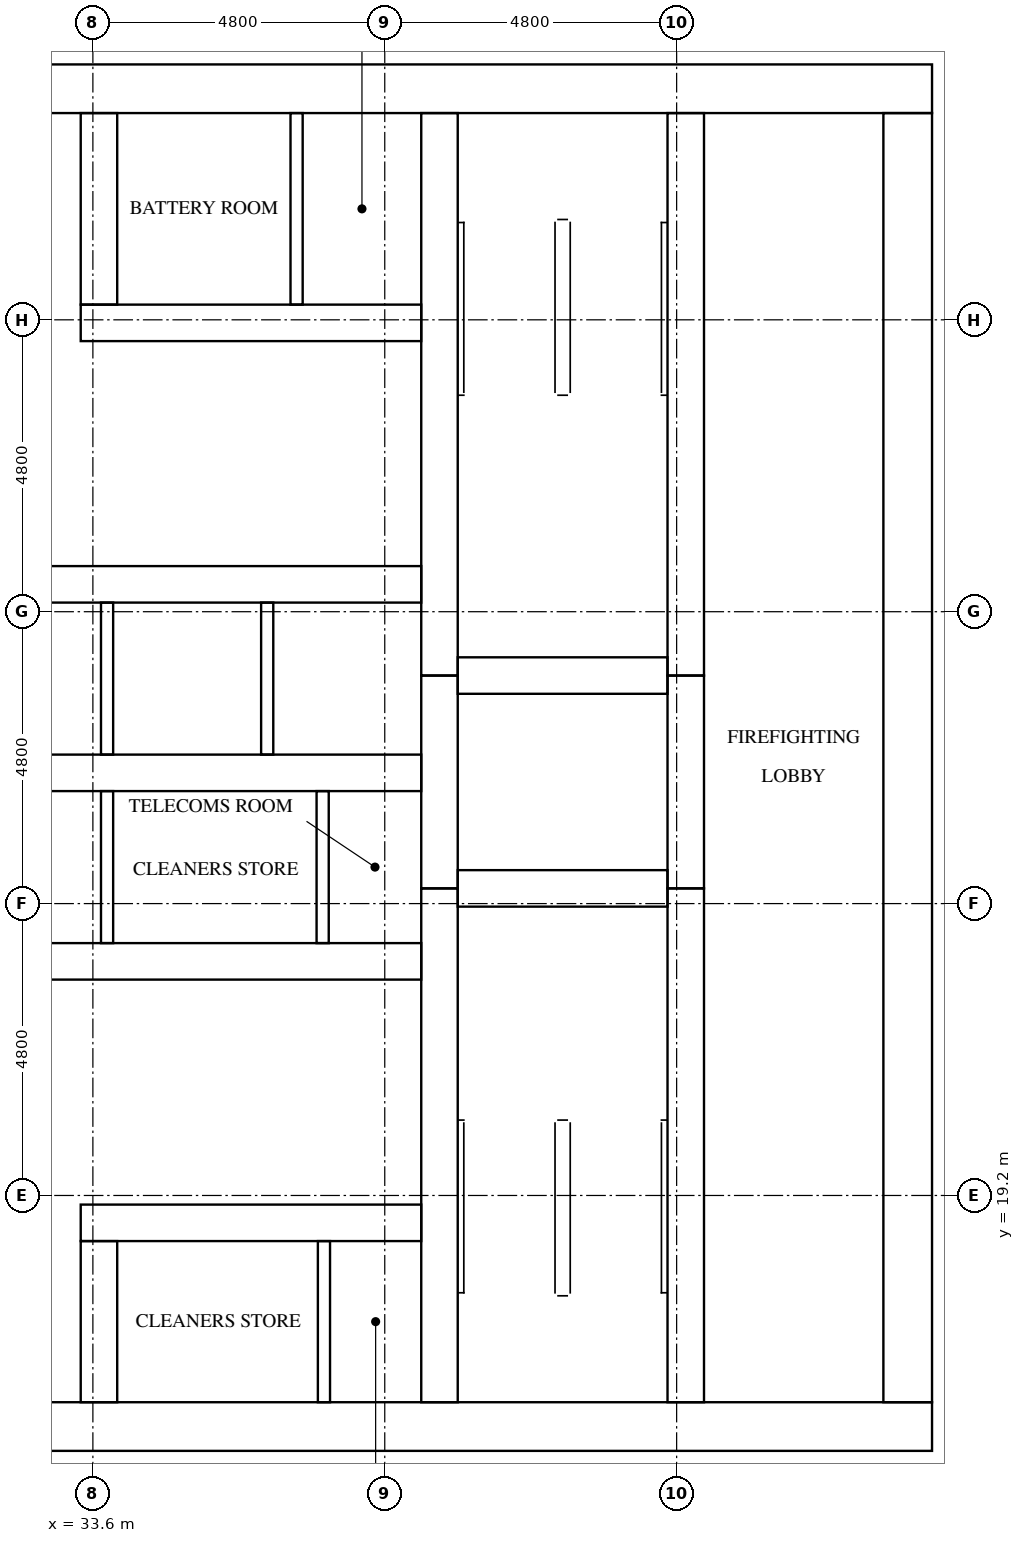
"""IFC4 building model, lengths in metres.
Left out: names, types, materials, properties, quantities, classifications, styles, units other than length and angle.
Written with IfcOpenShell. Run it as: python <this file> out.ifc"""

import sys

from ifc_helpers import new_model, si_unit, direction, frame, frame_2d, origin, place, context, subcontext, project, spatial, rectangle, extrude, element, fill, save


model = new_model("IFC4")
c1 = context("Model", 3, precision=1e-05, world=origin(), true_north=direction((0.0, 1.0)))
c2 = subcontext(c1, "Body", "Model", "MODEL_VIEW")
j1 = project(units=[si_unit("LENGTHUNIT", "METRE"), si_unit("PLANEANGLEUNIT", "RADIAN")], contexts=[c1])
p1 = place(None, origin())
s1 = spatial("IfcSite", under=j1, at=p1, CompositionType="ELEMENT")
p2 = place(p1, origin())
s2 = spatial("IfcBuilding", under=s1, at=p2, CompositionType="ELEMENT")
p3 = place(p2, frame((0.0, 0.0, 170.0)))
s3 = spatial("IfcBuildingStorey", under=s2, at=p3, CompositionType="ELEMENT", Elevation=170.0)
p4 = place(p3, frame((15.0, 15.4, 0.0), z_axis=(0.0, 0.0, 1.0), x_axis=(1.0, 0.0, 0.0)))
e1 = element("IfcWall", 1, at=p4, inside=s3, PredefinedType="SHEAR", context=c2, shape_type="SweptSolid", body=[
    extrude(rectangle(XDim=32.4, YDim=0.8, at=frame_2d((16.2, 0.0))), origin(), (0.0, 0.0, 1.0), 3.1),
])
p5 = place(p4, frame((15.3, 0.0, 0.0)))
e2 = element("IfcOpeningElement", 2, at=p5, cuts=e1, PredefinedType="OPENING", context=c2, shape_type="SweptSolid", body=[
    extrude(rectangle(XDim=1.8, YDim=2.1, at=frame_2d((0.9, 1.05))), frame((0.0, 0.41, 0.0), z_axis=(0.0, -1.0, 0.0), x_axis=(1.0, 0.0, 0.0)), (0.0, 0.0, 1.0), 0.82),
])
p6 = place(p3, frame((15.0, 37.4, 0.0), z_axis=(0.0, 0.0, 1.0), x_axis=(1.0, 0.0, 0.0)))
e3 = element("IfcWall", 3, at=p6, inside=s3, PredefinedType="SHEAR", context=c2, shape_type="SweptSolid", body=[
    extrude(rectangle(XDim=32.4, YDim=0.8, at=frame_2d((16.2, 0.0))), origin(), (0.0, 0.0, 1.0), 3.1),
])
p7 = place(p6, frame((15.3, 0.0, 0.0)))
e4 = element("IfcOpeningElement", 4, at=p7, cuts=e3, PredefinedType="OPENING", context=c2, shape_type="SweptSolid", body=[
    extrude(rectangle(XDim=1.8, YDim=2.1, at=frame_2d((0.9, 1.05))), frame((0.0, 0.41, 0.0), z_axis=(0.0, -1.0, 0.0), x_axis=(1.0, 0.0, 0.0)), (0.0, 0.0, 1.0), 0.82),
])
p8 = place(p6, frame((1.51, 0.0, 0.0)))
e5 = element("IfcOpeningElement", 5, at=p8, cuts=e3, PredefinedType="OPENING", context=c2, shape_type="SweptSolid", body=[
    extrude(rectangle(XDim=1.0, YDim=2.1, at=frame_2d((0.5, 1.05))), frame((0.0, 0.41, 0.0), z_axis=(0.0, -1.0, 0.0), x_axis=(1.0, 0.0, 0.0)), (0.0, 0.0, 1.0), 0.82),
])
p9 = place(p6, frame((5.11, 0.0, 0.0)))
e6 = element("IfcOpeningElement", 6, at=p9, cuts=e3, PredefinedType="OPENING", context=c2, shape_type="SweptSolid", body=[
    extrude(rectangle(XDim=1.0, YDim=2.1, at=frame_2d((0.5, 1.05))), frame((0.0, 0.41, 0.0), z_axis=(0.0, -1.0, 0.0), x_axis=(1.0, 0.0, 0.0)), (0.0, 0.0, 1.0), 0.82),
])
p10 = place(p3, frame((47.0, 15.8, 0.0), z_axis=(0.0, 0.0, 1.0), x_axis=(0.0, 1.0, 0.0)))
e7 = element("IfcWall", 7, at=p10, inside=s3, PredefinedType="SHEAR", context=c2, shape_type="SweptSolid", body=[
    extrude(rectangle(XDim=21.2, YDim=0.8, at=frame_2d((10.6, 0.0))), origin(), (0.0, 0.0, 1.0), 3.1),
])
p11 = place(p10, frame((10.3, 0.0, 0.0)))
e8 = element("IfcOpeningElement", 8, at=p11, cuts=e7, PredefinedType="OPENING", context=c2, shape_type="SweptSolid", body=[
    extrude(rectangle(XDim=1.2, YDim=2.1, at=frame_2d((0.6, 1.05))), frame((0.0, 0.41, 0.0), z_axis=(0.0, -1.0, 0.0), x_axis=(1.0, 0.0, 0.0)), (0.0, 0.0, 1.0), 0.82),
])
p12 = place(p3, frame((39.3, 15.8, 0.0), z_axis=(0.0, 0.0, 1.0), x_axis=(0.0, 1.0, 0.0)))
e9 = element("IfcWall", 9, at=p12, inside=s3, PredefinedType="SHEAR", context=c2, shape_type="SweptSolid", body=[
    extrude(rectangle(XDim=8.45, YDim=0.6, at=frame_2d((4.225, 0.0))), origin(), (0.0, 0.0, 1.0), 3.1),
])
p13 = place(p3, frame((39.3, 24.25, 0.0), z_axis=(0.0, 0.0, 1.0), x_axis=(0.0, 1.0, 0.0)))
e10 = element("IfcWall", 10, at=p13, inside=s3, PredefinedType="SHEAR", context=c2, shape_type="SweptSolid", body=[
    extrude(rectangle(XDim=3.5, YDim=0.6, at=frame_2d((1.75, 0.0))), origin(), (0.0, 0.0, 1.0), 3.1),
])
p14 = place(p3, frame((39.3, 27.75, 0.0), z_axis=(0.0, 0.0, 1.0), x_axis=(0.0, 1.0, 0.0)))
e11 = element("IfcWall", 11, at=p14, inside=s3, PredefinedType="SHEAR", context=c2, shape_type="SweptSolid", body=[
    extrude(rectangle(XDim=9.25, YDim=0.6, at=frame_2d((4.625, 0.0))), origin(), (0.0, 0.0, 1.0), 3.1),
])
p15 = place(p3, frame((43.35, 15.8, 0.0), z_axis=(0.0, 0.0, 1.0), x_axis=(0.0, 1.0, 0.0)))
e12 = element("IfcWall", 12, at=p15, inside=s3, PredefinedType="SHEAR", context=c2, shape_type="SweptSolid", body=[
    extrude(rectangle(XDim=8.45, YDim=0.6, at=frame_2d((4.225, 0.0))), origin(), (0.0, 0.0, 1.0), 3.1),
])
p16 = place(p15, frame((0.4, 0.0, 0.0)))
e13 = element("IfcOpeningElement", 13, at=p16, cuts=e12, PredefinedType="OPENING", context=c2, shape_type="SweptSolid", body=[
    extrude(rectangle(XDim=1.2, YDim=2.1, at=frame_2d((0.6, 1.05))), frame((0.0, 0.31, 0.0), z_axis=(0.0, -1.0, 0.0), x_axis=(1.0, 0.0, 0.0)), (0.0, 0.0, 1.0), 0.62),
])
p17 = place(p3, frame((43.35, 24.25, 0.0), z_axis=(0.0, 0.0, 1.0), x_axis=(0.0, 1.0, 0.0)))
e14 = element("IfcWall", 14, at=p17, inside=s3, PredefinedType="SHEAR", context=c2, shape_type="SweptSolid", body=[
    extrude(rectangle(XDim=3.5, YDim=0.6, at=frame_2d((1.75, 0.0))), origin(), (0.0, 0.0, 1.0), 3.1),
])
p18 = place(p17, frame((1.2, 0.0, 0.0)))
e15 = element("IfcOpeningElement", 15, at=p18, cuts=e14, PredefinedType="OPENING", context=c2, shape_type="SweptSolid", body=[
    extrude(rectangle(XDim=1.1, YDim=2.1, at=frame_2d((0.55, 1.05))), frame((0.0, 0.31, 0.0), z_axis=(0.0, -1.0, 0.0), x_axis=(1.0, 0.0, 0.0)), (0.0, 0.0, 1.0), 0.62),
])
p19 = place(p3, frame((43.35, 27.75, 0.0), z_axis=(0.0, 0.0, 1.0), x_axis=(0.0, 1.0, 0.0)))
e16 = element("IfcWall", 16, at=p19, inside=s3, PredefinedType="SHEAR", context=c2, shape_type="SweptSolid", body=[
    extrude(rectangle(XDim=9.25, YDim=0.6, at=frame_2d((4.625, 0.0))), origin(), (0.0, 0.0, 1.0), 3.1),
])
p20 = place(p19, frame((7.65, 0.0, 0.0)))
e17 = element("IfcOpeningElement", 17, at=p20, cuts=e16, PredefinedType="OPENING", context=c2, shape_type="SweptSolid", body=[
    extrude(rectangle(XDim=1.2, YDim=2.1, at=frame_2d((0.6, 1.05))), frame((0.0, 0.31, 0.0), z_axis=(0.0, -1.0, 0.0), x_axis=(1.0, 0.0, 0.0)), (0.0, 0.0, 1.0), 0.62),
])
for number, where, z_axis, x_axis in (
    (18, (39.6, 24.25, 0.0), (0.0, 0.0, 1.0), (1.0, 0.0, 0.0)),
    (19, (39.6, 27.75, 0.0), (0.0, 0.0, 1.0), (1.0, 0.0, 0.0)),
):
    element("IfcWall", number, at=place(p3, frame(where, z_axis=z_axis, x_axis=x_axis)), inside=s3, PredefinedType="SHEAR", context=c2, shape_type="SweptSolid", body=[
        extrude(rectangle(XDim=3.45, YDim=0.6, at=frame_2d((1.725, 0.0))), origin(), (0.0, 0.0, 1.0), 3.1),
    ])
p21 = place(p3, frame((33.4, 18.75, 0.0), z_axis=(0.0, 0.0, 1.0), x_axis=(1.0, 0.0, 0.0)))
e20 = element("IfcWall", 20, at=p21, inside=s3, PredefinedType="SHEAR", context=c2, shape_type="SweptSolid", body=[
    extrude(rectangle(XDim=5.6, YDim=0.6, at=frame_2d((2.8, 0.0))), origin(), (0.0, 0.0, 1.0), 3.1),
])
p22 = place(p21, frame((1.75, 0.0, 0.0)))
e21 = element("IfcOpeningElement", 21, at=p22, cuts=e20, PredefinedType="OPENING", context=c2, shape_type="SweptSolid", body=[
    extrude(rectangle(XDim=1.0, YDim=2.1, at=frame_2d((0.5, 1.05))), frame((0.0, 0.31, 0.0), z_axis=(0.0, -1.0, 0.0), x_axis=(1.0, 0.0, 0.0)), (0.0, 0.0, 1.0), 0.62),
])
p23 = place(p21, frame((4.35, 0.0, 0.0)))
e22 = element("IfcOpeningElement", 22, at=p23, cuts=e20, PredefinedType="OPENING", context=c2, shape_type="SweptSolid", body=[
    extrude(rectangle(XDim=1.0, YDim=2.1, at=frame_2d((0.5, 1.05))), frame((0.0, 0.31, 0.0), z_axis=(0.0, -1.0, 0.0), x_axis=(1.0, 0.0, 0.0)), (0.0, 0.0, 1.0), 0.62),
])
p24 = place(p3, frame((23.4, 23.05, 0.0), z_axis=(0.0, 0.0, 1.0), x_axis=(1.0, 0.0, 0.0)))
e23 = element("IfcWall", 23, at=p24, inside=s3, PredefinedType="SHEAR", context=c2, shape_type="SweptSolid", body=[
    extrude(rectangle(XDim=15.6, YDim=0.6, at=frame_2d((7.8, 0.0))), origin(), (0.0, 0.0, 1.0), 3.1),
])
p25 = place(p24, frame((2.033, 0.0, 0.0)))
e24 = element("IfcOpeningElement", 24, at=p25, cuts=e23, PredefinedType="OPENING", context=c2, shape_type="SweptSolid", body=[
    extrude(rectangle(XDim=1.0, YDim=2.1, at=frame_2d((0.5, 1.05))), frame((0.0, 0.31, 0.0), z_axis=(0.0, -1.0, 0.0), x_axis=(1.0, 0.0, 0.0)), (0.0, 0.0, 1.0), 0.62),
])
p26 = place(p24, frame((11.706, 0.0, 0.0)))
e25 = element("IfcOpeningElement", 25, at=p26, cuts=e23, PredefinedType="OPENING", context=c2, shape_type="SweptSolid", body=[
    extrude(rectangle(XDim=1.0, YDim=2.1, at=frame_2d((0.5, 1.05))), frame((0.0, 0.31, 0.0), z_axis=(0.0, -1.0, 0.0), x_axis=(1.0, 0.0, 0.0)), (0.0, 0.0, 1.0), 0.62),
])
p27 = place(p24, frame((14.339, 0.0, 0.0)))
e26 = element("IfcOpeningElement", 26, at=p27, cuts=e23, PredefinedType="OPENING", context=c2, shape_type="SweptSolid", body=[
    extrude(rectangle(XDim=1.0, YDim=2.1, at=frame_2d((0.5, 1.05))), frame((0.0, 0.31, 0.0), z_axis=(0.0, -1.0, 0.0), x_axis=(1.0, 0.0, 0.0)), (0.0, 0.0, 1.0), 0.62),
])
p28 = place(p3, frame((23.4, 26.15, 0.0), z_axis=(0.0, 0.0, 1.0), x_axis=(1.0, 0.0, 0.0)))
e27 = element("IfcWall", 27, at=p28, inside=s3, PredefinedType="SHEAR", context=c2, shape_type="SweptSolid", body=[
    extrude(rectangle(XDim=15.6, YDim=0.6, at=frame_2d((7.8, 0.0))), origin(), (0.0, 0.0, 1.0), 3.1),
])
p29 = place(p3, frame((23.4, 29.25, 0.0), z_axis=(0.0, 0.0, 1.0), x_axis=(1.0, 0.0, 0.0)))
e28 = element("IfcWall", 28, at=p29, inside=s3, PredefinedType="SHEAR", context=c2, shape_type="SweptSolid", body=[
    extrude(rectangle(XDim=15.6, YDim=0.6, at=frame_2d((7.8, 0.0))), origin(), (0.0, 0.0, 1.0), 3.1),
])
p30 = place(p29, frame((0.667, 0.0, 0.0)))
e29 = element("IfcOpeningElement", 29, at=p30, cuts=e28, PredefinedType="OPENING", context=c2, shape_type="SweptSolid", body=[
    extrude(rectangle(XDim=1.1, YDim=2.1, at=frame_2d((0.55, 1.05))), frame((0.0, 0.31, 0.0), z_axis=(0.0, -1.0, 0.0), x_axis=(1.0, 0.0, 0.0)), (0.0, 0.0, 1.0), 0.62),
])
p31 = place(p29, frame((3.3, 0.0, 0.0)))
e30 = element("IfcOpeningElement", 30, at=p31, cuts=e28, PredefinedType="OPENING", context=c2, shape_type="SweptSolid", body=[
    extrude(rectangle(XDim=1.1, YDim=2.1, at=frame_2d((0.55, 1.05))), frame((0.0, 0.31, 0.0), z_axis=(0.0, -1.0, 0.0), x_axis=(1.0, 0.0, 0.0)), (0.0, 0.0, 1.0), 0.62),
])
p32 = place(p29, frame((5.933, 0.0, 0.0)))
e31 = element("IfcOpeningElement", 31, at=p32, cuts=e28, PredefinedType="OPENING", context=c2, shape_type="SweptSolid", body=[
    extrude(rectangle(XDim=1.1, YDim=2.1, at=frame_2d((0.55, 1.05))), frame((0.0, 0.31, 0.0), z_axis=(0.0, -1.0, 0.0), x_axis=(1.0, 0.0, 0.0)), (0.0, 0.0, 1.0), 0.62),
])
p33 = place(p29, frame((8.567, 0.0, 0.0)))
e32 = element("IfcOpeningElement", 32, at=p33, cuts=e28, PredefinedType="OPENING", context=c2, shape_type="SweptSolid", body=[
    extrude(rectangle(XDim=1.1, YDim=2.1, at=frame_2d((0.55, 1.05))), frame((0.0, 0.31, 0.0), z_axis=(0.0, -1.0, 0.0), x_axis=(1.0, 0.0, 0.0)), (0.0, 0.0, 1.0), 0.62),
])
p34 = place(p29, frame((11.2, 0.0, 0.0)))
e33 = element("IfcOpeningElement", 33, at=p34, cuts=e28, PredefinedType="OPENING", context=c2, shape_type="SweptSolid", body=[
    extrude(rectangle(XDim=1.1, YDim=2.1, at=frame_2d((0.55, 1.05))), frame((0.0, 0.31, 0.0), z_axis=(0.0, -1.0, 0.0), x_axis=(1.0, 0.0, 0.0)), (0.0, 0.0, 1.0), 0.62),
])
p35 = place(p29, frame((13.833, 0.0, 0.0)))
e34 = element("IfcOpeningElement", 34, at=p35, cuts=e28, PredefinedType="OPENING", context=c2, shape_type="SweptSolid", body=[
    extrude(rectangle(XDim=1.1, YDim=2.1, at=frame_2d((0.55, 1.05))), frame((0.0, 0.31, 0.0), z_axis=(0.0, -1.0, 0.0), x_axis=(1.0, 0.0, 0.0)), (0.0, 0.0, 1.0), 0.62),
])
p36 = place(p3, frame((33.4, 33.55, 0.0), z_axis=(0.0, 0.0, 1.0), x_axis=(1.0, 0.0, 0.0)))
e35 = element("IfcWall", 35, at=p36, inside=s3, PredefinedType="SHEAR", context=c2, shape_type="SweptSolid", body=[
    extrude(rectangle(XDim=5.6, YDim=0.6, at=frame_2d((2.8, 0.0))), origin(), (0.0, 0.0, 1.0), 3.1),
])
p37 = place(p36, frame((1.525, 0.0, 0.0)))
e36 = element("IfcOpeningElement", 36, at=p37, cuts=e35, PredefinedType="OPENING", context=c2, shape_type="SweptSolid", body=[
    extrude(rectangle(XDim=1.0, YDim=2.1, at=frame_2d((0.5, 1.05))), frame((0.0, 0.31, 0.0), z_axis=(0.0, -1.0, 0.0), x_axis=(1.0, 0.0, 0.0)), (0.0, 0.0, 1.0), 0.62),
])
p38 = place(p36, frame((4.125, 0.0, 0.0)))
e37 = element("IfcOpeningElement", 37, at=p38, cuts=e35, PredefinedType="OPENING", context=c2, shape_type="SweptSolid", body=[
    extrude(rectangle(XDim=1.0, YDim=2.1, at=frame_2d((0.5, 1.05))), frame((0.0, 0.31, 0.0), z_axis=(0.0, -1.0, 0.0), x_axis=(1.0, 0.0, 0.0)), (0.0, 0.0, 1.0), 0.62),
])
p39 = place(p3, frame((33.7, 15.8, 0.0), z_axis=(0.0, 0.0, 1.0), x_axis=(0.0, 1.0, 0.0)))
e38 = element("IfcWall", 38, at=p39, inside=s3, PredefinedType="SHEAR", context=c2, shape_type="SweptSolid", body=[
    extrude(rectangle(XDim=2.65, YDim=0.6, at=frame_2d((1.325, 0.0))), origin(), (0.0, 0.0, 1.0), 3.1),
])
p40 = place(p3, frame((33.7, 33.85, 0.0), z_axis=(0.0, 0.0, 1.0), x_axis=(0.0, 1.0, 0.0)))
e39 = element("IfcWall", 39, at=p40, inside=s3, PredefinedType="SHEAR", context=c2, shape_type="SweptSolid", body=[
    extrude(rectangle(XDim=3.15, YDim=0.6, at=frame_2d((1.575, 0.0))), origin(), (0.0, 0.0, 1.0), 3.1),
])
for number, where, z_axis, x_axis in (
    (40, (33.833, 23.35, 0.0), (0.0, 0.0, 1.0), (0.0, 1.0, 0.0)),
    (41, (33.833, 26.45, 0.0), (0.0, 0.0, 1.0), (0.0, 1.0, 0.0)),
    (42, (36.467, 26.45, 0.0), (0.0, 0.0, 1.0), (0.0, 1.0, 0.0)),
):
    element("IfcWall", number, at=place(p3, frame(where, z_axis=z_axis, x_axis=x_axis)), inside=s3, PredefinedType="SOLIDWALL", context=c2, shape_type="SweptSolid", body=[
        extrude(rectangle(XDim=2.5, YDim=0.2, at=frame_2d((1.25, 0.0))), origin(), (0.0, 0.0, 1.0), 3.1),
    ])
p41 = place(p3, frame((37.379, 23.35, 0.0), z_axis=(0.0, 0.0, 1.0), x_axis=(0.0, 1.0, 0.0)))
e43 = element("IfcWall", 43, at=p41, inside=s3, PredefinedType="PARTITIONING", context=c2, shape_type="SweptSolid", body=[
    extrude(rectangle(XDim=2.5, YDim=0.2, at=frame_2d((1.25, 0.0))), origin(), (0.0, 0.0, 1.0), 3.1),
])
p42 = place(p3, frame((37.4, 15.8, 0.0), z_axis=(0.0, 0.0, 1.0), x_axis=(0.0, 1.0, 0.0)))
e44 = element("IfcWall", 44, at=p42, inside=s3, PredefinedType="PARTITIONING", context=c2, shape_type="SweptSolid", body=[
    extrude(rectangle(XDim=2.65, YDim=0.2, at=frame_2d((1.325, 0.0))), origin(), (0.0, 0.0, 1.0), 3.1),
])
p43 = place(p3, frame((36.95, 33.85, 0.0), z_axis=(0.0, 0.0, 1.0), x_axis=(0.0, 1.0, 0.0)))
e45 = element("IfcWall", 45, at=p43, inside=s3, PredefinedType="PARTITIONING", context=c2, shape_type="SweptSolid", body=[
    extrude(rectangle(XDim=3.15, YDim=0.2, at=frame_2d((1.575, 0.0))), origin(), (0.0, 0.0, 1.0), 3.1),
])
p44 = place(p33, origin())
e46 = element("IfcDoor", 46, at=p44, inside=s3, OperationType="DOUBLE_DOOR_SLIDING", PredefinedType="DOOR", context=c2, shape_type="SweptSolid", body=[
    extrude(rectangle(XDim=1.1, YDim=2.1, at=frame_2d((0.55, 1.05))), frame((0.0, 0.025, 0.0), z_axis=(0.0, -1.0, 0.0), x_axis=(1.0, 0.0, 0.0)), (0.0, 0.0, 1.0), 0.05),
])
fill(e32, e46)
p45 = place(p34, origin())
e47 = element("IfcDoor", 47, at=p45, inside=s3, OperationType="DOUBLE_DOOR_SLIDING", PredefinedType="DOOR", context=c2, shape_type="SweptSolid", body=[
    extrude(rectangle(XDim=1.1, YDim=2.1, at=frame_2d((0.55, 1.05))), frame((0.0, 0.025, 0.0), z_axis=(0.0, -1.0, 0.0), x_axis=(1.0, 0.0, 0.0)), (0.0, 0.0, 1.0), 0.05),
])
fill(e33, e47)
p46 = place(p35, origin())
e48 = element("IfcDoor", 48, at=p46, inside=s3, OperationType="DOUBLE_DOOR_SLIDING", PredefinedType="DOOR", context=c2, shape_type="SweptSolid", body=[
    extrude(rectangle(XDim=1.1, YDim=2.1, at=frame_2d((0.55, 1.05))), frame((0.0, 0.025, 0.0), z_axis=(0.0, -1.0, 0.0), x_axis=(1.0, 0.0, 0.0)), (0.0, 0.0, 1.0), 0.05),
])
fill(e34, e48)
p47 = place(p18, origin())
e49 = element("IfcDoor", 49, at=p47, inside=s3, OperationType="DOUBLE_DOOR_SLIDING", PredefinedType="DOOR", context=c2, shape_type="SweptSolid", body=[
    extrude(rectangle(XDim=1.1, YDim=2.1, at=frame_2d((0.55, 1.05))), frame((0.0, 0.025, 0.0), z_axis=(0.0, -1.0, 0.0), x_axis=(1.0, 0.0, 0.0)), (0.0, 0.0, 1.0), 0.05),
])
fill(e15, e49)
p48 = place(p16, origin())
e50 = element("IfcDoor", 50, at=p48, inside=s3, OperationType="SINGLE_SWING_LEFT", PredefinedType="DOOR", context=c2, shape_type="SweptSolid", body=[
    extrude(rectangle(XDim=1.2, YDim=2.1, at=frame_2d((0.6, 1.05))), frame((0.0, 0.025, 0.0), z_axis=(0.0, -1.0, 0.0), x_axis=(1.0, 0.0, 0.0)), (0.0, 0.0, 1.0), 0.05),
])
fill(e13, e50)
p49 = place(p20, origin())
e51 = element("IfcDoor", 51, at=p49, inside=s3, OperationType="SINGLE_SWING_RIGHT", PredefinedType="DOOR", context=c2, shape_type="SweptSolid", body=[
    extrude(rectangle(XDim=1.2, YDim=2.1, at=frame_2d((0.6, 1.05))), frame((0.0, 0.025, 0.0), z_axis=(0.0, -1.0, 0.0), x_axis=(1.0, 0.0, 0.0)), (0.0, 0.0, 1.0), 0.05),
])
fill(e17, e51)
p50 = place(p11, origin())
e52 = element("IfcDoor", 52, at=p50, inside=s3, OperationType="SINGLE_SWING_RIGHT", PredefinedType="DOOR", context=c2, shape_type="SweptSolid", body=[
    extrude(rectangle(XDim=1.2, YDim=2.1, at=frame_2d((0.6, 1.05))), frame((0.0, 0.025, 0.0), z_axis=(0.0, -1.0, 0.0), x_axis=(1.0, 0.0, 0.0)), (0.0, 0.0, 1.0), 0.05),
])
fill(e8, e52)
p51 = place(p26, frame((1.0, 0.0, 0.0), z_axis=(0.0, 0.0, 1.0), x_axis=(-1.0, 0.0, 0.0)))
e53 = element("IfcDoor", 53, at=p51, inside=s3, OperationType="SINGLE_SWING_RIGHT", PredefinedType="DOOR", context=c2, shape_type="SweptSolid", body=[
    extrude(rectangle(XDim=1.0, YDim=2.1, at=frame_2d((0.5, 1.05))), frame((0.0, 0.025, 0.0), z_axis=(0.0, -1.0, 0.0), x_axis=(1.0, 0.0, 0.0)), (0.0, 0.0, 1.0), 0.05),
])
fill(e25, e53)
p52 = place(p27, frame((1.0, 0.0, 0.0), z_axis=(0.0, 0.0, 1.0), x_axis=(-1.0, 0.0, 0.0)))
e54 = element("IfcDoor", 54, at=p52, inside=s3, OperationType="SINGLE_SWING_LEFT", PredefinedType="DOOR", context=c2, shape_type="SweptSolid", body=[
    extrude(rectangle(XDim=1.0, YDim=2.1, at=frame_2d((0.5, 1.05))), frame((0.0, 0.025, 0.0), z_axis=(0.0, -1.0, 0.0), x_axis=(1.0, 0.0, 0.0)), (0.0, 0.0, 1.0), 0.05),
])
fill(e26, e54)
p53 = place(p22, origin())
e55 = element("IfcDoor", 55, at=p53, inside=s3, OperationType="SINGLE_SWING_RIGHT", PredefinedType="DOOR", context=c2, shape_type="SweptSolid", body=[
    extrude(rectangle(XDim=1.0, YDim=2.1, at=frame_2d((0.5, 1.05))), frame((0.0, 0.025, 0.0), z_axis=(0.0, -1.0, 0.0), x_axis=(1.0, 0.0, 0.0)), (0.0, 0.0, 1.0), 0.05),
])
fill(e21, e55)
p54 = place(p23, origin())
e56 = element("IfcDoor", 56, at=p54, inside=s3, OperationType="SINGLE_SWING_LEFT", PredefinedType="DOOR", context=c2, shape_type="SweptSolid", body=[
    extrude(rectangle(XDim=1.0, YDim=2.1, at=frame_2d((0.5, 1.05))), frame((0.0, 0.025, 0.0), z_axis=(0.0, -1.0, 0.0), x_axis=(1.0, 0.0, 0.0)), (0.0, 0.0, 1.0), 0.05),
])
fill(e22, e56)
p55 = place(p37, frame((1.0, 0.0, 0.0), z_axis=(0.0, 0.0, 1.0), x_axis=(-1.0, 0.0, 0.0)))
e57 = element("IfcDoor", 57, at=p55, inside=s3, OperationType="SINGLE_SWING_RIGHT", PredefinedType="DOOR", context=c2, shape_type="SweptSolid", body=[
    extrude(rectangle(XDim=1.0, YDim=2.1, at=frame_2d((0.5, 1.05))), frame((0.0, 0.025, 0.0), z_axis=(0.0, -1.0, 0.0), x_axis=(1.0, 0.0, 0.0)), (0.0, 0.0, 1.0), 0.05),
])
fill(e36, e57)
p56 = place(p38, frame((1.0, 0.0, 0.0), z_axis=(0.0, 0.0, 1.0), x_axis=(-1.0, 0.0, 0.0)))
e58 = element("IfcDoor", 58, at=p56, inside=s3, OperationType="SINGLE_SWING_LEFT", PredefinedType="DOOR", context=c2, shape_type="SweptSolid", body=[
    extrude(rectangle(XDim=1.0, YDim=2.1, at=frame_2d((0.5, 1.05))), frame((0.0, 0.025, 0.0), z_axis=(0.0, -1.0, 0.0), x_axis=(1.0, 0.0, 0.0)), (0.0, 0.0, 1.0), 0.05),
])
fill(e37, e58)
save(model, sys.argv[1])
